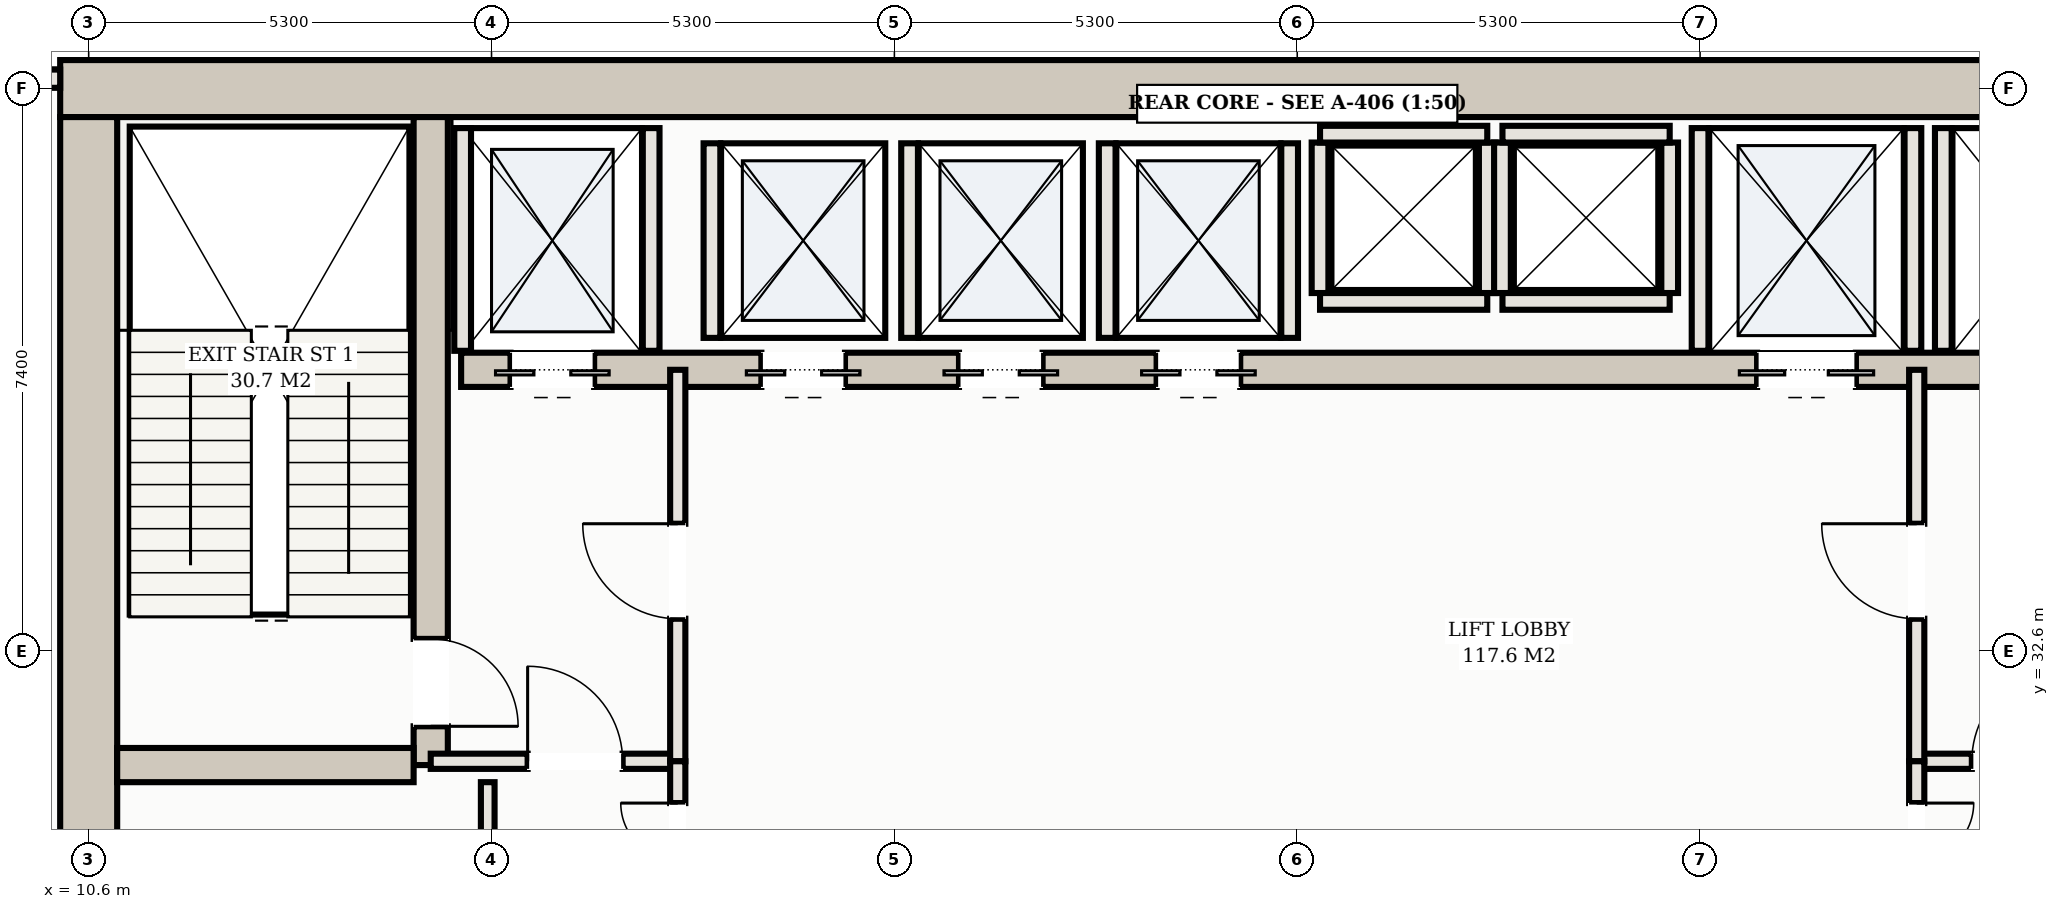
"""IFC4 building model, lengths in metres.
Left out: names, types, materials, properties, quantities, classifications, styles, units other than length and angle.
Written with IfcOpenShell. Run it as: python <this file> out.ifc"""

import sys

from ifc_helpers import new_model, si_unit, direction, frame, frame_2d, origin, place, context, subcontext, project, spatial, rectangle, extrude, element, fill, save


model = new_model("IFC4")
c1 = context("Model", 3, precision=1e-05, world=origin(), true_north=direction((0.0, 1.0)))
c2 = subcontext(c1, "Body", "Model", "MODEL_VIEW")
j1 = project(units=[si_unit("LENGTHUNIT", "METRE"), si_unit("PLANEANGLEUNIT", "RADIAN")], contexts=[c1])
p1 = place(None, origin())
s1 = spatial("IfcSite", under=j1, at=p1, CompositionType="ELEMENT")
p2 = place(p1, origin())
s2 = spatial("IfcBuilding", under=s1, at=p2, CompositionType="ELEMENT")
p3 = place(p2, frame((0.0, 0.0, 77.2)))
s3 = spatial("IfcBuildingStorey", under=s2, at=p3, CompositionType="ELEMENT", Elevation=77.2)
p4 = place(p3, frame((10.225, 40.0, 0.0), z_axis=(0.0, 0.0, 1.0), x_axis=(1.0, 0.0, 0.0)))
e1 = element("IfcWall", 1, at=p4, inside=s3, PredefinedType="SHEAR", context=c2, shape_type="SweptSolid", body=[
    extrude(rectangle(XDim=32.55, YDim=0.75, at=frame_2d((16.275, 0.0))), origin(), (0.0, 0.0, 1.0), 4.29),
])
p5 = place(p3, frame((10.6, 25.575, 0.0), z_axis=(0.0, 0.0, 1.0), x_axis=(0.0, 1.0, 0.0)))
e2 = element("IfcWall", 2, at=p5, inside=s3, PredefinedType="SHEAR", context=c2, shape_type="SweptSolid", body=[
    extrude(rectangle(XDim=14.05, YDim=0.75, at=frame_2d((7.025, 0.0))), origin(), (0.0, 0.0, 1.0), 4.29),
])
p6 = place(p3, frame((15.1, 31.1, 0.0), z_axis=(0.0, 0.0, 1.0), x_axis=(0.0, 1.0, 0.0)))
e3 = element("IfcWall", 3, at=p6, inside=s3, PredefinedType="SHEAR", context=c2, shape_type="SweptSolid", body=[
    extrude(rectangle(XDim=8.525, YDim=0.45, at=frame_2d((4.262, 0.0))), origin(), (0.0, 0.0, 1.0), 4.29),
])
p7 = place(p6, frame((0.51, 0.0, 0.0)))
e4 = element("IfcOpeningElement", 4, at=p7, cuts=e3, PredefinedType="OPENING", context=c2, shape_type="SweptSolid", body=[
    extrude(rectangle(XDim=1.15, YDim=2.2, at=frame_2d((0.575, 1.1))), frame((0.0, 0.235, 0.0), z_axis=(0.0, -1.0, 0.0), x_axis=(1.0, 0.0, 0.0)), (0.0, 0.0, 1.0), 0.47),
])
p8 = place(p3, frame((10.975, 31.1, 0.0), z_axis=(0.0, 0.0, 1.0), x_axis=(1.0, 0.0, 0.0)))
e5 = element("IfcWall", 5, at=p8, inside=s3, PredefinedType="SHEAR", context=c2, shape_type="SweptSolid", body=[
    extrude(rectangle(XDim=3.9, YDim=0.45, at=frame_2d((1.95, 0.0))), origin(), (0.0, 0.0, 1.0), 4.29),
])
p9 = place(p3, frame((15.5, 36.3, 0.0), z_axis=(0.0, 0.0, 1.0), x_axis=(1.0, 0.0, 0.0)))
e6 = element("IfcWall", 6, at=p9, inside=s3, PredefinedType="SHEAR", context=c2, shape_type="SweptSolid", body=[
    extrude(rectangle(XDim=22.0, YDim=0.45, at=frame_2d((11.0, 0.0))), origin(), (0.0, 0.0, 1.0), 4.29),
])
p10 = place(p9, frame((0.65, 0.0, 0.0)))
e7 = element("IfcOpeningElement", 7, at=p10, cuts=e6, PredefinedType="OPENING", context=c2, shape_type="SweptSolid", body=[
    extrude(rectangle(XDim=1.1, YDim=2.15, at=frame_2d((0.55, 1.075))), frame((0.0, 0.235, 0.0), z_axis=(0.0, -1.0, 0.0), x_axis=(1.0, 0.0, 0.0)), (0.0, 0.0, 1.0), 0.47),
])
p11 = place(p9, frame((20.25, 0.0, 0.0)))
e8 = element("IfcOpeningElement", 8, at=p11, cuts=e6, PredefinedType="OPENING", context=c2, shape_type="SweptSolid", body=[
    extrude(rectangle(XDim=1.1, YDim=2.15, at=frame_2d((0.55, 1.075))), frame((0.0, 0.235, 0.0), z_axis=(0.0, -1.0, 0.0), x_axis=(1.0, 0.0, 0.0)), (0.0, 0.0, 1.0), 0.47),
])
p12 = place(p9, frame((17.05, 0.0, 0.0)))
e9 = element("IfcOpeningElement", 9, at=p12, cuts=e6, PredefinedType="OPENING", context=c2, shape_type="SweptSolid", body=[
    extrude(rectangle(XDim=1.3, YDim=2.2, at=frame_2d((0.65, 1.1))), frame((0.0, 0.235, 0.0), z_axis=(0.0, -1.0, 0.0), x_axis=(1.0, 0.0, 0.0)), (0.0, 0.0, 1.0), 0.47),
])
p13 = place(p9, frame((3.95, 0.0, 0.0)))
e10 = element("IfcOpeningElement", 10, at=p13, cuts=e6, PredefinedType="OPENING", context=c2, shape_type="SweptSolid", body=[
    extrude(rectangle(XDim=1.1, YDim=2.15, at=frame_2d((0.55, 1.075))), frame((0.0, 0.235, 0.0), z_axis=(0.0, -1.0, 0.0), x_axis=(1.0, 0.0, 0.0)), (0.0, 0.0, 1.0), 0.47),
])
p14 = place(p9, frame((6.55, 0.0, 0.0)))
e11 = element("IfcOpeningElement", 11, at=p14, cuts=e6, PredefinedType="OPENING", context=c2, shape_type="SweptSolid", body=[
    extrude(rectangle(XDim=1.1, YDim=2.15, at=frame_2d((0.55, 1.075))), frame((0.0, 0.235, 0.0), z_axis=(0.0, -1.0, 0.0), x_axis=(1.0, 0.0, 0.0)), (0.0, 0.0, 1.0), 0.47),
])
p15 = place(p9, frame((9.15, 0.0, 0.0)))
e12 = element("IfcOpeningElement", 12, at=p15, cuts=e6, PredefinedType="OPENING", context=c2, shape_type="SweptSolid", body=[
    extrude(rectangle(XDim=1.1, YDim=2.15, at=frame_2d((0.55, 1.075))), frame((0.0, 0.235, 0.0), z_axis=(0.0, -1.0, 0.0), x_axis=(1.0, 0.0, 0.0)), (0.0, 0.0, 1.0), 0.47),
])
for number, where, z_axis, x_axis in (
    (13, (15.52, 36.55, 0.0), (0.0, 0.0, 1.0), (0.0, 1.0, 0.0)),
    (14, (18.0, 36.55, 0.0), (0.0, 0.0, 1.0), (0.0, 1.0, 0.0)),
    (15, (35.0, 36.55, 0.0), (0.0, 0.0, 1.0), (0.0, 1.0, 0.0)),
    (16, (31.8, 36.55, 0.0), (0.0, 0.0, 1.0), (0.0, 1.0, 0.0)),
    (17, (34.6, 36.55, 0.0), (0.0, 0.0, 1.0), (0.0, 1.0, 0.0)),
):
    element("IfcWall", number, at=place(p3, frame(where, z_axis=z_axis, x_axis=x_axis)), inside=s3, PredefinedType="SOLIDWALL", context=c2, shape_type="SweptSolid", body=[
        extrude(rectangle(XDim=2.93, YDim=0.22, at=frame_2d((1.465, 0.0))), origin(), (0.0, 0.0, 1.0), 4.29),
    ])
for number, where, z_axis, x_axis in (
    (18, (18.8, 36.72, 0.0), (0.0, 0.0, 1.0), (0.0, 1.0, 0.0)),
    (19, (21.4, 36.72, 0.0), (0.0, 0.0, 1.0), (0.0, 1.0, 0.0)),
    (20, (24.0, 36.72, 0.0), (0.0, 0.0, 1.0), (0.0, 1.0, 0.0)),
    (21, (26.4, 36.72, 0.0), (0.0, 0.0, 1.0), (0.0, 1.0, 0.0)),
):
    element("IfcWall", number, at=place(p3, frame(where, z_axis=z_axis, x_axis=x_axis)), inside=s3, PredefinedType="SOLIDWALL", context=c2, shape_type="SweptSolid", body=[
        extrude(rectangle(XDim=2.56, YDim=0.22, at=frame_2d((1.28, 0.0))), origin(), (0.0, 0.0, 1.0), 4.29),
    ])
for number, where, z_axis, x_axis in (
    (22, (26.8, 37.31, 0.0), (0.0, 0.0, 1.0), (0.0, 1.0, 0.0)),
    (23, (29.0, 37.31, 0.0), (0.0, 0.0, 1.0), (0.0, 1.0, 0.0)),
):
    element("IfcWall", number, at=place(p3, frame(where, z_axis=z_axis, x_axis=x_axis)), inside=s3, PredefinedType="SOLIDWALL", context=c2, shape_type="SweptSolid", body=[
        extrude(rectangle(XDim=1.98, YDim=0.22, at=frame_2d((0.99, 0.0))), origin(), (0.0, 0.0, 1.0), 4.29),
    ])
for number, where, z_axis, x_axis in (
    (24, (26.8, 39.4, 0.0), (0.0, 0.0, 1.0), (1.0, 0.0, 0.0)),
    (25, (26.8, 37.2, 0.0), (0.0, 0.0, 1.0), (1.0, 0.0, 0.0)),
):
    element("IfcWall", number, at=place(p3, frame(where, z_axis=z_axis, x_axis=x_axis)), inside=s3, PredefinedType="SOLIDWALL", context=c2, shape_type="SweptSolid", body=[
        extrude(rectangle(XDim=2.2, YDim=0.22, at=frame_2d((1.1, 0.0))), origin(), (0.0, 0.0, 1.0), 4.29),
    ])
for number, where, z_axis, x_axis in (
    (26, (29.2, 37.31, 0.0), (0.0, 0.0, 1.0), (0.0, 1.0, 0.0)),
    (27, (31.4, 37.31, 0.0), (0.0, 0.0, 1.0), (0.0, 1.0, 0.0)),
):
    element("IfcWall", number, at=place(p3, frame(where, z_axis=z_axis, x_axis=x_axis)), inside=s3, PredefinedType="SOLIDWALL", context=c2, shape_type="SweptSolid", body=[
        extrude(rectangle(XDim=1.98, YDim=0.22, at=frame_2d((0.99, 0.0))), origin(), (0.0, 0.0, 1.0), 4.29),
    ])
for number, where, z_axis, x_axis in (
    (28, (29.2, 39.4, 0.0), (0.0, 0.0, 1.0), (1.0, 0.0, 0.0)),
    (29, (29.2, 37.2, 0.0), (0.0, 0.0, 1.0), (1.0, 0.0, 0.0)),
):
    element("IfcWall", number, at=place(p3, frame(where, z_axis=z_axis, x_axis=x_axis)), inside=s3, PredefinedType="SOLIDWALL", context=c2, shape_type="SweptSolid", body=[
        extrude(rectangle(XDim=2.2, YDim=0.22, at=frame_2d((1.1, 0.0))), origin(), (0.0, 0.0, 1.0), 4.29),
    ])
p16 = place(p3, frame((10.225, 40.13, 0.0), z_axis=(0.0, 0.0, 1.0), x_axis=(-1.0, 0.0, 0.0)))
e30 = element("IfcWall", 30, at=p16, inside=s3, PredefinedType="SOLIDWALL", context=c2, shape_type="SweptSolid", body=[
    extrude(rectangle(XDim=3.675, YDim=0.24, at=frame_2d((1.837, 0.0))), origin(), (0.0, 0.0, 1.0), 4.29),
])
p17 = place(p3, frame((15.1, 31.15, 0.0), z_axis=(0.0, 0.0, 1.0), x_axis=(1.0, 0.0, 0.0)))
e31 = element("IfcWall", 31, at=p17, inside=s3, PredefinedType="PARTITIONING", context=c2, shape_type="SweptSolid", body=[
    extrude(rectangle(XDim=3.25, YDim=0.2, at=frame_2d((1.625, 0.0))), origin(), (0.0, 0.0, 1.0), 4.29),
])
p18 = place(p17, frame((1.275, 0.0, 0.0)))
e32 = element("IfcOpeningElement", 32, at=p18, cuts=e31, PredefinedType="OPENING", context=c2, shape_type="SweptSolid", body=[
    extrude(rectangle(XDim=1.25, YDim=2.2, at=frame_2d((0.625, 1.1))), frame((0.0, 0.11, 0.0), z_axis=(0.0, -1.0, 0.0), x_axis=(1.0, 0.0, 0.0)), (0.0, 0.0, 1.0), 0.22),
])
p19 = place(p3, frame((18.35, 31.15, 0.0), z_axis=(0.0, 0.0, 1.0), x_axis=(0.0, 1.0, 0.0)))
e33 = element("IfcWall", 33, at=p19, inside=s3, PredefinedType="PARTITIONING", context=c2, shape_type="SweptSolid", body=[
    extrude(rectangle(XDim=5.15, YDim=0.2, at=frame_2d((2.575, 0.0))), origin(), (0.0, 0.0, 1.0), 4.29),
])
p20 = place(p19, frame((1.875, 0.0, 0.0)))
e34 = element("IfcOpeningElement", 34, at=p20, cuts=e33, PredefinedType="OPENING", context=c2, shape_type="SweptSolid", body=[
    extrude(rectangle(XDim=1.25, YDim=2.2, at=frame_2d((0.625, 1.1))), frame((0.0, 0.11, 0.0), z_axis=(0.0, -1.0, 0.0), x_axis=(1.0, 0.0, 0.0)), (0.0, 0.0, 1.0), 0.22),
])
p21 = place(p3, frame((34.65, 31.15, 0.0), z_axis=(0.0, 0.0, 1.0), x_axis=(1.0, 0.0, 0.0)))
e35 = element("IfcWall", 35, at=p21, inside=s3, PredefinedType="PARTITIONING", context=c2, shape_type="SweptSolid", body=[
    extrude(rectangle(XDim=3.25, YDim=0.2, at=frame_2d((1.625, 0.0))), origin(), (0.0, 0.0, 1.0), 4.29),
])
p22 = place(p21, frame((0.725, 0.0, 0.0)))
e36 = element("IfcOpeningElement", 36, at=p22, cuts=e35, PredefinedType="OPENING", context=c2, shape_type="SweptSolid", body=[
    extrude(rectangle(XDim=1.25, YDim=2.2, at=frame_2d((0.625, 1.1))), frame((0.0, 0.11, 0.0), z_axis=(0.0, -1.0, 0.0), x_axis=(1.0, 0.0, 0.0)), (0.0, 0.0, 1.0), 0.22),
])
p23 = place(p3, frame((34.65, 31.15, 0.0), z_axis=(0.0, 0.0, 1.0), x_axis=(0.0, 1.0, 0.0)))
e37 = element("IfcWall", 37, at=p23, inside=s3, PredefinedType="PARTITIONING", context=c2, shape_type="SweptSolid", body=[
    extrude(rectangle(XDim=5.15, YDim=0.2, at=frame_2d((2.575, 0.0))), origin(), (0.0, 0.0, 1.0), 4.29),
])
p24 = place(p23, frame((1.875, 0.0, 0.0)))
e38 = element("IfcOpeningElement", 38, at=p24, cuts=e37, PredefinedType="OPENING", context=c2, shape_type="SweptSolid", body=[
    extrude(rectangle(XDim=1.25, YDim=2.2, at=frame_2d((0.625, 1.1))), frame((0.0, 0.11, 0.0), z_axis=(0.0, -1.0, 0.0), x_axis=(1.0, 0.0, 0.0)), (0.0, 0.0, 1.0), 0.22),
])
p25 = place(p3, frame((15.85, 25.575, 0.0), z_axis=(0.0, 0.0, 1.0), x_axis=(0.0, 1.0, 0.0)))
e39 = element("IfcWall", 39, at=p25, inside=s3, PredefinedType="PARTITIONING", context=c2, shape_type="SweptSolid", body=[
    extrude(rectangle(XDim=5.3, YDim=0.18, at=frame_2d((2.65, 0.0))), origin(), (0.0, 0.0, 1.0), 4.29),
])
p26 = place(p25, frame((0.74, 0.0, 0.0)))
e40 = element("IfcOpeningElement", 40, at=p26, cuts=e39, PredefinedType="OPENING", context=c2, shape_type="SweptSolid", body=[
    extrude(rectangle(XDim=0.92, YDim=2.15, at=frame_2d((0.46, 1.075))), frame((0.0, 0.1, 0.0), z_axis=(0.0, -1.0, 0.0), x_axis=(1.0, 0.0, 0.0)), (0.0, 0.0, 1.0), 0.2),
])
p27 = place(p25, frame((3.34, 0.0, 0.0)))
e41 = element("IfcOpeningElement", 41, at=p27, cuts=e39, PredefinedType="OPENING", context=c2, shape_type="SweptSolid", body=[
    extrude(rectangle(XDim=0.92, YDim=2.15, at=frame_2d((0.46, 1.075))), frame((0.0, 0.1, 0.0), z_axis=(0.0, -1.0, 0.0), x_axis=(1.0, 0.0, 0.0)), (0.0, 0.0, 1.0), 0.2),
])
p28 = place(p3, frame((18.35, 28.55, 0.0), z_axis=(0.0, 0.0, 1.0), x_axis=(0.0, 1.0, 0.0)))
e42 = element("IfcWall", 42, at=p28, inside=s3, PredefinedType="PARTITIONING", context=c2, shape_type="SweptSolid", body=[
    extrude(rectangle(XDim=2.6, YDim=0.2, at=frame_2d((1.3, 0.0))), origin(), (0.0, 0.0, 1.0), 4.29),
])
p29 = place(p28, frame((0.55, 0.0, 0.0)))
e43 = element("IfcOpeningElement", 43, at=p29, cuts=e42, PredefinedType="OPENING", context=c2, shape_type="SweptSolid", body=[
    extrude(rectangle(XDim=1.5, YDim=2.25, at=frame_2d((0.75, 1.125))), frame((0.0, 0.11, 0.0), z_axis=(0.0, -1.0, 0.0), x_axis=(1.0, 0.0, 0.0)), (0.0, 0.0, 1.0), 0.22),
])
p30 = place(p3, frame((34.65, 28.55, 0.0), z_axis=(0.0, 0.0, 1.0), x_axis=(0.0, 1.0, 0.0)))
e44 = element("IfcWall", 44, at=p30, inside=s3, PredefinedType="PARTITIONING", context=c2, shape_type="SweptSolid", body=[
    extrude(rectangle(XDim=2.6, YDim=0.2, at=frame_2d((1.3, 0.0))), origin(), (0.0, 0.0, 1.0), 4.29),
])
p31 = place(p30, frame((0.55, 0.0, 0.0)))
e45 = element("IfcOpeningElement", 45, at=p31, cuts=e44, PredefinedType="OPENING", context=c2, shape_type="SweptSolid", body=[
    extrude(rectangle(XDim=1.5, YDim=2.25, at=frame_2d((0.75, 1.125))), frame((0.0, 0.11, 0.0), z_axis=(0.0, -1.0, 0.0), x_axis=(1.0, 0.0, 0.0)), (0.0, 0.0, 1.0), 0.22),
])
p32 = place(p10, frame((1.1, 0.0, 0.0), z_axis=(0.0, 0.0, 1.0), x_axis=(-1.0, 0.0, 0.0)))
e46 = element("IfcDoor", 46, at=p32, inside=s3, OperationType="DOUBLE_DOOR_SLIDING", PredefinedType="DOOR", context=c2, shape_type="SweptSolid", body=[
    extrude(rectangle(XDim=1.1, YDim=2.15, at=frame_2d((0.55, 1.075))), frame((0.0, 0.025, 0.0), z_axis=(0.0, -1.0, 0.0), x_axis=(1.0, 0.0, 0.0)), (0.0, 0.0, 1.0), 0.05),
])
fill(e7, e46)
p33 = place(p12, frame((1.3, 0.0, 0.0), z_axis=(0.0, 0.0, 1.0), x_axis=(-1.0, 0.0, 0.0)))
e47 = element("IfcDoor", 47, at=p33, inside=s3, OperationType="DOUBLE_DOOR_SLIDING", PredefinedType="DOOR", context=c2, shape_type="SweptSolid", body=[
    extrude(rectangle(XDim=1.3, YDim=2.2, at=frame_2d((0.65, 1.1))), frame((0.0, 0.025, 0.0), z_axis=(0.0, -1.0, 0.0), x_axis=(1.0, 0.0, 0.0)), (0.0, 0.0, 1.0), 0.05),
])
fill(e9, e47)
p34 = place(p13, frame((1.1, 0.0, 0.0), z_axis=(0.0, 0.0, 1.0), x_axis=(-1.0, 0.0, 0.0)))
e48 = element("IfcDoor", 48, at=p34, inside=s3, OperationType="DOUBLE_DOOR_SLIDING", PredefinedType="DOOR", context=c2, shape_type="SweptSolid", body=[
    extrude(rectangle(XDim=1.1, YDim=2.15, at=frame_2d((0.55, 1.075))), frame((0.0, 0.025, 0.0), z_axis=(0.0, -1.0, 0.0), x_axis=(1.0, 0.0, 0.0)), (0.0, 0.0, 1.0), 0.05),
])
fill(e10, e48)
p35 = place(p14, frame((1.1, 0.0, 0.0), z_axis=(0.0, 0.0, 1.0), x_axis=(-1.0, 0.0, 0.0)))
e49 = element("IfcDoor", 49, at=p35, inside=s3, OperationType="DOUBLE_DOOR_SLIDING", PredefinedType="DOOR", context=c2, shape_type="SweptSolid", body=[
    extrude(rectangle(XDim=1.1, YDim=2.15, at=frame_2d((0.55, 1.075))), frame((0.0, 0.025, 0.0), z_axis=(0.0, -1.0, 0.0), x_axis=(1.0, 0.0, 0.0)), (0.0, 0.0, 1.0), 0.05),
])
fill(e11, e49)
p36 = place(p15, frame((1.1, 0.0, 0.0), z_axis=(0.0, 0.0, 1.0), x_axis=(-1.0, 0.0, 0.0)))
e50 = element("IfcDoor", 50, at=p36, inside=s3, OperationType="DOUBLE_DOOR_SLIDING", PredefinedType="DOOR", context=c2, shape_type="SweptSolid", body=[
    extrude(rectangle(XDim=1.1, YDim=2.15, at=frame_2d((0.55, 1.075))), frame((0.0, 0.025, 0.0), z_axis=(0.0, -1.0, 0.0), x_axis=(1.0, 0.0, 0.0)), (0.0, 0.0, 1.0), 0.05),
])
fill(e12, e50)
p37 = place(p18, origin())
e51 = element("IfcDoor", 51, at=p37, inside=s3, OperationType="SINGLE_SWING_LEFT", PredefinedType="DOOR", context=c2, shape_type="SweptSolid", body=[
    extrude(rectangle(XDim=1.25, YDim=2.2, at=frame_2d((0.625, 1.1))), frame((0.0, 0.025, 0.0), z_axis=(0.0, -1.0, 0.0), x_axis=(1.0, 0.0, 0.0)), (0.0, 0.0, 1.0), 0.05),
])
fill(e32, e51)
p38 = place(p20, origin())
e52 = element("IfcDoor", 52, at=p38, inside=s3, OperationType="SINGLE_SWING_RIGHT", PredefinedType="DOOR", context=c2, shape_type="SweptSolid", body=[
    extrude(rectangle(XDim=1.25, YDim=2.2, at=frame_2d((0.625, 1.1))), frame((0.0, 0.025, 0.0), z_axis=(0.0, -1.0, 0.0), x_axis=(1.0, 0.0, 0.0)), (0.0, 0.0, 1.0), 0.05),
])
fill(e34, e52)
p39 = place(p22, origin())
e53 = element("IfcDoor", 53, at=p39, inside=s3, OperationType="SINGLE_SWING_RIGHT", PredefinedType="DOOR", context=c2, shape_type="SweptSolid", body=[
    extrude(rectangle(XDim=1.25, YDim=2.2, at=frame_2d((0.625, 1.1))), frame((0.0, 0.025, 0.0), z_axis=(0.0, -1.0, 0.0), x_axis=(1.0, 0.0, 0.0)), (0.0, 0.0, 1.0), 0.05),
])
fill(e36, e53)
p40 = place(p24, origin())
e54 = element("IfcDoor", 54, at=p40, inside=s3, OperationType="SINGLE_SWING_RIGHT", PredefinedType="DOOR", context=c2, shape_type="SweptSolid", body=[
    extrude(rectangle(XDim=1.25, YDim=2.2, at=frame_2d((0.625, 1.1))), frame((0.0, 0.025, 0.0), z_axis=(0.0, -1.0, 0.0), x_axis=(1.0, 0.0, 0.0)), (0.0, 0.0, 1.0), 0.05),
])
fill(e38, e54)
p41 = place(p7, frame((1.15, 0.0, 0.0), z_axis=(0.0, 0.0, 1.0), x_axis=(-1.0, 0.0, 0.0)))
e55 = element("IfcDoor", 55, at=p41, inside=s3, OperationType="SINGLE_SWING_RIGHT", PredefinedType="DOOR", context=c2, shape_type="SweptSolid", body=[
    extrude(rectangle(XDim=1.15, YDim=2.2, at=frame_2d((0.575, 1.1))), frame((0.0, 0.025, 0.0), z_axis=(0.0, -1.0, 0.0), x_axis=(1.0, 0.0, 0.0)), (0.0, 0.0, 1.0), 0.05),
])
fill(e4, e55)
p42 = place(p29, origin())
e56 = element("IfcDoor", 56, at=p42, inside=s3, OperationType="DOUBLE_DOOR_SINGLE_SWING", PredefinedType="DOOR", context=c2, shape_type="SweptSolid", body=[
    extrude(rectangle(XDim=1.5, YDim=2.25, at=frame_2d((0.75, 1.125))), frame((0.0, 0.025, 0.0), z_axis=(0.0, -1.0, 0.0), x_axis=(1.0, 0.0, 0.0)), (0.0, 0.0, 1.0), 0.05),
])
fill(e43, e56)
p43 = place(p31, frame((1.5, 0.0, 0.0), z_axis=(0.0, 0.0, 1.0), x_axis=(-1.0, 0.0, 0.0)))
e57 = element("IfcDoor", 57, at=p43, inside=s3, OperationType="DOUBLE_DOOR_SINGLE_SWING", PredefinedType="DOOR", context=c2, shape_type="SweptSolid", body=[
    extrude(rectangle(XDim=1.5, YDim=2.25, at=frame_2d((0.75, 1.125))), frame((0.0, 0.025, 0.0), z_axis=(0.0, -1.0, 0.0), x_axis=(1.0, 0.0, 0.0)), (0.0, 0.0, 1.0), 0.05),
])
fill(e45, e57)
save(model, sys.argv[1])
